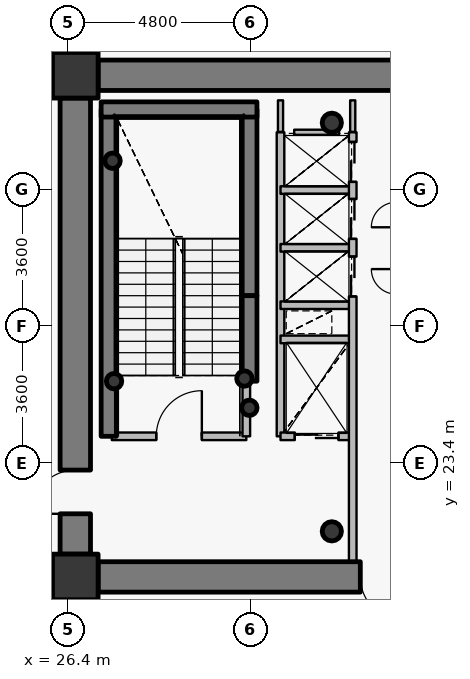
"""IFC4 building model, lengths in metres.
Left out: names, types, materials, properties, quantities, classifications, styles, units other than length and angle.
Written with IfcOpenShell. Run it as: python <this file> out.ifc"""

import sys

from ifc_helpers import new_model, si_unit, direction, frame, frame_2d, origin, origin_2d, place, context, subcontext, project, spatial, rectangle, hollow_circle, extrude, source, transform, mapped, element, fill, save


model = new_model("IFC4")
c1 = context("Model", 3, precision=1e-05, world=origin(), true_north=direction((0.0, 1.0)))
c2 = subcontext(c1, "Body", "Model", "MODEL_VIEW")
j1 = project(units=[si_unit("LENGTHUNIT", "METRE"), si_unit("PLANEANGLEUNIT", "RADIAN")], contexts=[c1])
p1 = place(None, origin())
s1 = spatial("IfcSite", under=j1, at=p1, CompositionType="ELEMENT")
p2 = place(p1, origin())
s2 = spatial("IfcBuilding", under=s1, at=p2, CompositionType="ELEMENT")
p3 = place(p2, frame((0.0, 0.0, 197.4)))
s3 = spatial("IfcBuildingStorey", under=s2, at=p3, CompositionType="ELEMENT", Elevation=197.4)
for number, where, z_axis, x_axis in (
    (1, (26.6, 20.4, 0.0), (0.0, 0.0, 1.0), (1.0, 0.0, 0.0)),
    (2, (26.6, 33.6, 0.0), (0.0, 0.0, 1.0), (1.0, 0.0, 0.0)),
):
    element("IfcColumn", number, at=place(p3, frame(where, z_axis=z_axis, x_axis=x_axis)), inside=s3, PredefinedType="COLUMN", context=c2, shape_type="SweptSolid", body=[
        extrude(rectangle(XDim=1.2, YDim=1.2, at=origin_2d()), origin(), (0.0, 0.0, 1.0), 3.75),
    ])
for number, where, z_axis, x_axis in (
    (3, (33.35, 21.6, 0.0), (0.0, 0.0, 1.0), (1.0, 0.0, 0.0)),
    (4, (33.35, 32.35, 0.0), (0.0, 0.0, 1.0), (1.0, 0.0, 0.0)),
):
    element("IfcColumn", number, at=place(p3, frame(where, z_axis=z_axis, x_axis=x_axis)), inside=s3, PredefinedType="COLUMN", context=c2, shape_type="SweptSolid", body=[
        extrude(hollow_circle(Radius=0.254, WallThickness=0.02, at=origin_2d()), origin(), (0.0, 0.0, 1.0), 3.75),
    ])
p4 = place(p3, frame((27.48, 24.1, 0.0), z_axis=(0.0, 0.0, 1.0), x_axis=(0.0, 1.0, 0.0)))
e5 = element("IfcWall", 5, at=p4, inside=s3, PredefinedType="SHEAR", context=c2, shape_type="SweptSolid", body=[
    extrude(rectangle(XDim=8.6, YDim=0.4, at=frame_2d((4.3, 0.0))), origin(), (0.0, 0.0, 1.0), 3.75),
])
p5 = place(p3, frame((31.18, 27.8, 0.0), z_axis=(0.0, 0.0, 1.0), x_axis=(0.0, 1.0, 0.0)))
e6 = element("IfcWall", 6, at=p5, inside=s3, PredefinedType="SHEAR", context=c2, shape_type="SweptSolid", body=[
    extrude(rectangle(XDim=4.9, YDim=0.4, at=frame_2d((2.45, 0.0))), origin(), (0.0, 0.0, 1.0), 3.75),
])
p6 = place(p3, frame((27.28, 32.7, 0.0), z_axis=(0.0, 0.0, 1.0), x_axis=(1.0, 0.0, 0.0)))
e7 = element("IfcWall", 7, at=p6, inside=s3, PredefinedType="SHEAR", context=c2, shape_type="SweptSolid", body=[
    extrude(rectangle(XDim=4.1, YDim=0.4, at=frame_2d((2.05, 0.0))), origin(), (0.0, 0.0, 1.0), 3.75),
])
for number, where, z_axis, x_axis in (
    (8, (27.58, 31.35, 0.0), (0.0, 0.0, 1.0), (1.0, 0.0, 0.0)),
    (9, (31.05, 25.62, 0.0), (0.0, 0.0, 1.0), (1.0, 0.0, 0.0)),
    (10, (31.18, 24.85, 0.0), (0.0, 0.0, 1.0), (1.0, 0.0, 0.0)),
    (11, (27.62, 25.55, 0.0), (0.0, 0.0, 1.0), (1.0, 0.0, 0.0)),
):
    element("IfcColumn", number, at=place(p3, frame(where, z_axis=z_axis, x_axis=x_axis)), inside=s3, PredefinedType="COLUMN", context=c2, shape_type="SweptSolid", body=[
        extrude(hollow_circle(Radius=0.203, WallThickness=0.016, at=origin_2d()), origin(), (0.0, 0.0, 1.0), 3.75),
    ])
p7 = place(p3, frame((27.2, 33.6, 0.0), z_axis=(0.0, 0.0, 1.0), x_axis=(1.0, 0.0, 0.0)))
e12 = element("IfcWall", 12, at=p7, inside=s3, PredefinedType="SHEAR", context=c2, shape_type="SweptSolid", body=[
    extrude(rectangle(XDim=17.6, YDim=0.8, at=frame_2d((8.8, 0.0))), origin(), (0.0, 0.0, 1.0), 2.95),
])
p8 = place(p7, frame((13.45, 0.0, 0.0)))
e13 = element("IfcOpeningElement", 13, at=p8, cuts=e12, PredefinedType="OPENING", context=c2, shape_type="SweptSolid", body=[
    extrude(rectangle(XDim=1.15, YDim=2.15, at=origin_2d()), frame((0.575, 0.41, 1.075), z_axis=(0.0, -1.0, 0.0), x_axis=(1.0, 0.0, 0.0)), (0.0, 0.0, 1.0), 0.82),
])
p9 = place(p3, frame((44.8, 20.4, 0.0), z_axis=(0.0, 0.0, 1.0), x_axis=(-1.0, 0.0, 0.0)))
e14 = element("IfcWall", 14, at=p9, inside=s3, PredefinedType="SHEAR", context=c2, shape_type="SweptSolid", body=[
    extrude(rectangle(XDim=17.6, YDim=0.8, at=frame_2d((8.8, 0.0))), origin(), (0.0, 0.0, 1.0), 2.95),
])
p10 = place(p9, frame((9.55, 0.0, 0.0)))
e15 = element("IfcOpeningElement", 15, at=p10, cuts=e14, PredefinedType="OPENING", context=c2, shape_type="SweptSolid", body=[
    extrude(rectangle(XDim=1.15, YDim=2.15, at=origin_2d()), frame((0.575, 0.41, 1.075), z_axis=(0.0, -1.0, 0.0), x_axis=(1.0, 0.0, 0.0)), (0.0, 0.0, 1.0), 0.82),
])
p11 = place(p3, frame((26.6, 21.0, 0.0), z_axis=(0.0, 0.0, 1.0), x_axis=(0.0, 1.0, 0.0)))
e16 = element("IfcWall", 16, at=p11, inside=s3, PredefinedType="SHEAR", context=c2, shape_type="SweptSolid", body=[
    extrude(rectangle(XDim=12.0, YDim=0.8, at=frame_2d((6.0, 0.0))), origin(), (0.0, 0.0, 1.0), 2.95),
])
p12 = place(p11, frame((1.061, 0.0, 0.0)))
e17 = element("IfcOpeningElement", 17, at=p12, cuts=e16, PredefinedType="OPENING", context=c2, shape_type="SweptSolid", body=[
    extrude(rectangle(XDim=1.15, YDim=2.15, at=origin_2d()), frame((0.575, 0.41, 1.075), z_axis=(0.0, -1.0, 0.0), x_axis=(1.0, 0.0, 0.0)), (0.0, 0.0, 1.0), 0.82),
])
p13 = place(p3, frame((31.18, 25.55, 0.0), z_axis=(0.0, 0.0, 1.0), x_axis=(0.0, 1.0, 0.0)))
e18 = element("IfcWall", 18, at=p13, inside=s3, PredefinedType="SHEAR", context=c2, shape_type="SweptSolid", body=[
    extrude(rectangle(XDim=2.25, YDim=0.4, at=frame_2d((1.125, 0.0))), origin(), (0.0, 0.0, 1.0), 3.1),
])
p14 = place(p3, frame((27.56, 24.1, 0.0), z_axis=(0.0, 0.0, 1.0), x_axis=(1.0, 0.0, 0.0)))
e19 = element("IfcWall", 19, at=p14, inside=s3, PredefinedType="PARTITIONING", context=c2, shape_type="SweptSolid", body=[
    extrude(rectangle(XDim=3.54, YDim=0.2, at=frame_2d((1.77, 0.0))), origin(), (0.0, 0.0, 1.0), 3.5),
])
p15 = place(p14, frame((1.17, 0.0, 0.0)))
e20 = element("IfcOpeningElement", 20, at=p15, cuts=e19, PredefinedType="OPENING", context=c2, shape_type="SweptSolid", body=[
    extrude(rectangle(XDim=1.2, YDim=2.15, at=origin_2d()), frame((0.6, 0.11, 1.075), z_axis=(0.0, -1.0, 0.0), x_axis=(1.0, 0.0, 0.0)), (0.0, 0.0, 1.0), 0.22),
])
p16 = place(p3, frame((31.1, 24.1, 0.0), z_axis=(0.0, 0.0, 1.0), x_axis=(0.0, 1.0, 0.0)))
e21 = element("IfcWall", 21, at=p16, inside=s3, PredefinedType="PARTITIONING", context=c2, shape_type="SweptSolid", body=[
    extrude(rectangle(XDim=1.44, YDim=0.2, at=frame_2d((0.72, 0.0))), origin(), (0.0, 0.0, 1.0), 3.5),
])
p17 = place(p3, frame((32.0, 24.1, 0.0), z_axis=(0.0, 0.0, 1.0), x_axis=(0.0, 1.0, 0.0)))
e22 = element("IfcWall", 22, at=p17, inside=s3, PredefinedType="PARTITIONING", context=c2, shape_type="SweptSolid", body=[
    extrude(rectangle(XDim=8.0, YDim=0.2, at=frame_2d((4.0, 0.0))), origin(), (0.0, 0.0, 1.0), 3.5),
])
p18 = place(p3, frame((32.0, 24.1, 0.0), z_axis=(0.0, 0.0, 1.0), x_axis=(1.0, 0.0, 0.0)))
e23 = element("IfcWall", 23, at=p18, inside=s3, PredefinedType="PARTITIONING", context=c2, shape_type="SweptSolid", body=[
    extrude(rectangle(XDim=1.9, YDim=0.2, at=frame_2d((0.95, 0.0))), origin(), (0.0, 0.0, 1.0), 3.085),
])
p19 = place(p18, frame((0.375, 0.0, 0.0)))
e24 = element("IfcOpeningElement", 24, at=p19, cuts=e23, PredefinedType="OPENING", context=c2, shape_type="SweptSolid", body=[
    extrude(rectangle(XDim=1.15, YDim=2.15, at=origin_2d()), frame((0.575, 0.11, 1.075), z_axis=(0.0, -1.0, 0.0), x_axis=(1.0, 0.0, 0.0)), (0.0, 0.0, 1.0), 0.22),
])
for number, where, z_axis, x_axis in (
    (25, (32.0, 26.65, 0.0), (0.0, 0.0, 1.0), (1.0, 0.0, 0.0)),
    (26, (32.0, 27.55, 0.0), (0.0, 0.0, 1.0), (1.0, 0.0, 0.0)),
    (27, (32.0, 29.06, 0.0), (0.0, 0.0, 1.0), (1.0, 0.0, 0.0)),
    (28, (32.0, 30.58, 0.0), (0.0, 0.0, 1.0), (1.0, 0.0, 0.0)),
):
    element("IfcWall", number, at=place(p3, frame(where, z_axis=z_axis, x_axis=x_axis)), inside=s3, PredefinedType="PARTITIONING", context=c2, shape_type="SweptSolid", body=[
        extrude(rectangle(XDim=1.9, YDim=0.2, at=frame_2d((0.95, 0.0))), origin(), (0.0, 0.0, 1.0), 3.085),
    ])
p20 = place(p3, frame((33.9, 20.8, 0.0), z_axis=(0.0, 0.0, 1.0), x_axis=(0.0, 1.0, 0.0)))
e29 = element("IfcWall", 29, at=p20, inside=s3, PredefinedType="PARTITIONING", context=c2, shape_type="SweptSolid", body=[
    extrude(rectangle(XDim=11.3, YDim=0.2, at=frame_2d((5.65, 0.0))), origin(), (0.0, 0.0, 1.0), 3.085),
])
p21 = place(p20, frame((6.98, 0.0, 0.0)))
e30 = element("IfcOpeningElement", 30, at=p21, cuts=e29, PredefinedType="OPENING", context=c2, shape_type="SweptSolid", body=[
    extrude(rectangle(XDim=1.05, YDim=2.15, at=origin_2d()), frame((0.525, 0.11, 1.075), z_axis=(0.0, -1.0, 0.0), x_axis=(1.0, 0.0, 0.0)), (0.0, 0.0, 1.0), 0.22),
])
p22 = place(p20, frame((8.495, 0.0, 0.0)))
e31 = element("IfcOpeningElement", 31, at=p22, cuts=e29, PredefinedType="OPENING", context=c2, shape_type="SweptSolid", body=[
    extrude(rectangle(XDim=1.05, YDim=2.15, at=origin_2d()), frame((0.525, 0.11, 1.075), z_axis=(0.0, -1.0, 0.0), x_axis=(1.0, 0.0, 0.0)), (0.0, 0.0, 1.0), 0.22),
])
p23 = place(p20, frame((9.995, 0.0, 0.0)))
e32 = element("IfcOpeningElement", 32, at=p23, cuts=e29, PredefinedType="OPENING", context=c2, shape_type="SweptSolid", body=[
    extrude(rectangle(XDim=1.05, YDim=2.15, at=origin_2d()), frame((0.525, 0.11, 1.075), z_axis=(0.0, -1.0, 0.0), x_axis=(1.0, 0.0, 0.0)), (0.0, 0.0, 1.0), 0.22),
])
p24 = place(p3, frame((32.36, 32.1, 0.0), z_axis=(0.0, 0.0, 1.0), x_axis=(1.0, 0.0, 0.0)))
e33 = element("IfcWall", 33, at=p24, inside=s3, PredefinedType="PARTITIONING", context=c2, shape_type="SweptSolid", body=[
    extrude(rectangle(XDim=1.18, YDim=0.135, at=frame_2d((0.59, 0.0))), origin(), (0.0, 0.0, 1.0), 3.085),
])
p25 = place(p3, frame((32.0, 32.94, 0.0), z_axis=(0.0, 0.0, 1.0), x_axis=(0.0, -1.0, 0.0)))
e34 = element("IfcWall", 34, at=p25, inside=s3, PredefinedType="PARTITIONING", context=c2, shape_type="SweptSolid", body=[
    extrude(rectangle(XDim=0.83, YDim=0.135, at=frame_2d((0.415, 0.0))), origin(), (0.0, 0.0, 1.0), 3.035),
])
p26 = place(p3, frame((33.9, 32.11, 0.0), z_axis=(0.0, 0.0, 1.0), x_axis=(0.0, 1.0, 0.0)))
e35 = element("IfcWall", 35, at=p26, inside=s3, PredefinedType="PARTITIONING", context=c2, shape_type="SweptSolid", body=[
    extrude(rectangle(XDim=0.83, YDim=0.135, at=frame_2d((0.415, 0.0))), origin(), (0.0, 0.0, 1.0), 3.085),
])
p27 = place(p3, frame((27.19, 34.0, 0.0), z_axis=(0.0, 0.0, 1.0), x_axis=(-1.0, 0.0, 0.0)))
e36 = element("IfcWall", 36, at=p27, inside=s3, PredefinedType="PARTITIONING", context=c2, shape_type="SweptSolid", body=[
    extrude(rectangle(XDim=0.99, YDim=0.135, at=frame_2d((0.495, 0.0))), origin(), (0.0, 0.0, 1.0), 2.935),
])
p28 = place(p3, frame((26.2, 33.692, 0.0), z_axis=(0.0, 0.0, 1.0), x_axis=(0.0, -1.0, 0.0)))
e37 = element("IfcWall", 37, at=p28, inside=s3, PredefinedType="PARTITIONING", context=c2, shape_type="SweptSolid", body=[
    extrude(rectangle(XDim=0.682, YDim=0.135, at=frame_2d((0.341, 0.0))), origin(), (0.0, 0.0, 1.0), 3.5),
])
p29 = place(p3, frame((26.2, 20.99, 0.0), z_axis=(0.0, 0.0, 1.0), x_axis=(0.0, -1.0, 0.0)))
e38 = element("IfcWall", 38, at=p29, inside=s3, PredefinedType="PARTITIONING", context=c2, shape_type="SweptSolid", body=[
    extrude(rectangle(XDim=0.99, YDim=0.135, at=frame_2d((0.495, 0.0))), origin(), (0.0, 0.0, 1.0), 3.5),
])
p30 = place(p3, frame((26.508, 20.0, 0.0), z_axis=(0.0, 0.0, 1.0), x_axis=(1.0, 0.0, 0.0)))
e39 = element("IfcWall", 39, at=p30, inside=s3, PredefinedType="PARTITIONING", context=c2, shape_type="SweptSolid", body=[
    extrude(rectangle(XDim=0.682, YDim=0.135, at=frame_2d((0.341, 0.0))), origin(), (0.0, 0.0, 1.0), 2.935),
])
m1 = source(origin(), c2, "Body", "SweptSolid", [
    extrude(rectangle(XDim=1.15, YDim=2.15, at=origin_2d()), frame((0.575, 0.025, 1.075), z_axis=(0.0, -1.0, 0.0), x_axis=(1.0, 0.0, 0.0)), (0.0, 0.0, 1.0), 0.05),
])
p31 = place(p12, origin())
e40 = element("IfcDoor", 40, at=p31, inside=s3, OperationType="SINGLE_SWING_LEFT", PredefinedType="DOOR", context=c2, shape_type="MappedRepresentation", body=[
    mapped(m1, transform((0.0, 0.0, 0.0), x_axis=(1.0, 0.0, 0.0), y_axis=(0.0, 1.0, 0.0), z_axis=(0.0, 0.0, 1.0), scale=1.0)),
])
fill(e17, e40)
p32 = place(p10, origin())
e41 = element("IfcDoor", 41, at=p32, inside=s3, OperationType="SINGLE_SWING_LEFT", PredefinedType="DOOR", context=c2, shape_type="MappedRepresentation", body=[
    mapped(m1, transform((0.0, 0.0, 0.0), x_axis=(1.0, 0.0, 0.0), y_axis=(0.0, 1.0, 0.0), z_axis=(0.0, 0.0, 1.0), scale=1.0)),
])
fill(e15, e41)
m2 = source(origin(), c2, "Body", "SweptSolid", [
    extrude(rectangle(XDim=1.2, YDim=2.15, at=origin_2d()), frame((0.6, 0.025, 1.075), z_axis=(0.0, -1.0, 0.0), x_axis=(1.0, 0.0, 0.0)), (0.0, 0.0, 1.0), 0.05),
])
p33 = place(p15, origin())
e42 = element("IfcDoor", 42, at=p33, inside=s3, OperationType="SINGLE_SWING_RIGHT", PredefinedType="DOOR", context=c2, shape_type="MappedRepresentation", body=[
    mapped(m2, transform((0.0, 0.0, 0.0), x_axis=(1.0, 0.0, 0.0), y_axis=(0.0, 1.0, 0.0), z_axis=(0.0, 0.0, 1.0), scale=1.0)),
])
fill(e20, e42)
m3 = source(origin(), c2, "Body", "SweptSolid", [
    extrude(rectangle(XDim=1.15, YDim=2.15, at=origin_2d()), frame((0.575, 0.025, 1.075), z_axis=(0.0, -1.0, 0.0), x_axis=(1.0, 0.0, 0.0)), (0.0, 0.0, 1.0), 0.05),
])
p34 = place(p19, origin())
e43 = element("IfcDoor", 43, at=p34, inside=s3, OperationType="DOUBLE_DOOR_SLIDING", PredefinedType="USERDEFINED", context=c2, shape_type="MappedRepresentation", body=[
    mapped(m3, transform((0.0, 0.0, 0.0), x_axis=(1.0, 0.0, 0.0), y_axis=(0.0, 1.0, 0.0), z_axis=(0.0, 0.0, 1.0), scale=1.0)),
])
fill(e24, e43)
m4 = source(origin(), c2, "Body", "SweptSolid", [
    extrude(rectangle(XDim=1.05, YDim=2.15, at=origin_2d()), frame((0.525, 0.025, 1.075), z_axis=(0.0, -1.0, 0.0), x_axis=(1.0, 0.0, 0.0)), (0.0, 0.0, 1.0), 0.05),
])
p35 = place(p21, origin())
e44 = element("IfcDoor", 44, at=p35, inside=s3, OperationType="DOUBLE_DOOR_SLIDING", PredefinedType="USERDEFINED", context=c2, shape_type="MappedRepresentation", body=[
    mapped(m4, transform((0.0, 0.0, 0.0), x_axis=(1.0, 0.0, 0.0), y_axis=(0.0, 1.0, 0.0), z_axis=(0.0, 0.0, 1.0), scale=1.0)),
])
fill(e30, e44)
p36 = place(p22, origin())
e45 = element("IfcDoor", 45, at=p36, inside=s3, OperationType="DOUBLE_DOOR_SLIDING", PredefinedType="USERDEFINED", context=c2, shape_type="MappedRepresentation", body=[
    mapped(m4, transform((0.0, 0.0, 0.0), x_axis=(1.0, 0.0, 0.0), y_axis=(0.0, 1.0, 0.0), z_axis=(0.0, 0.0, 1.0), scale=1.0)),
])
fill(e31, e45)
p37 = place(p23, origin())
e46 = element("IfcDoor", 46, at=p37, inside=s3, OperationType="DOUBLE_DOOR_SLIDING", PredefinedType="USERDEFINED", context=c2, shape_type="MappedRepresentation", body=[
    mapped(m4, transform((0.0, 0.0, 0.0), x_axis=(1.0, 0.0, 0.0), y_axis=(0.0, 1.0, 0.0), z_axis=(0.0, 0.0, 1.0), scale=1.0)),
])
fill(e32, e46)
save(model, sys.argv[1])
